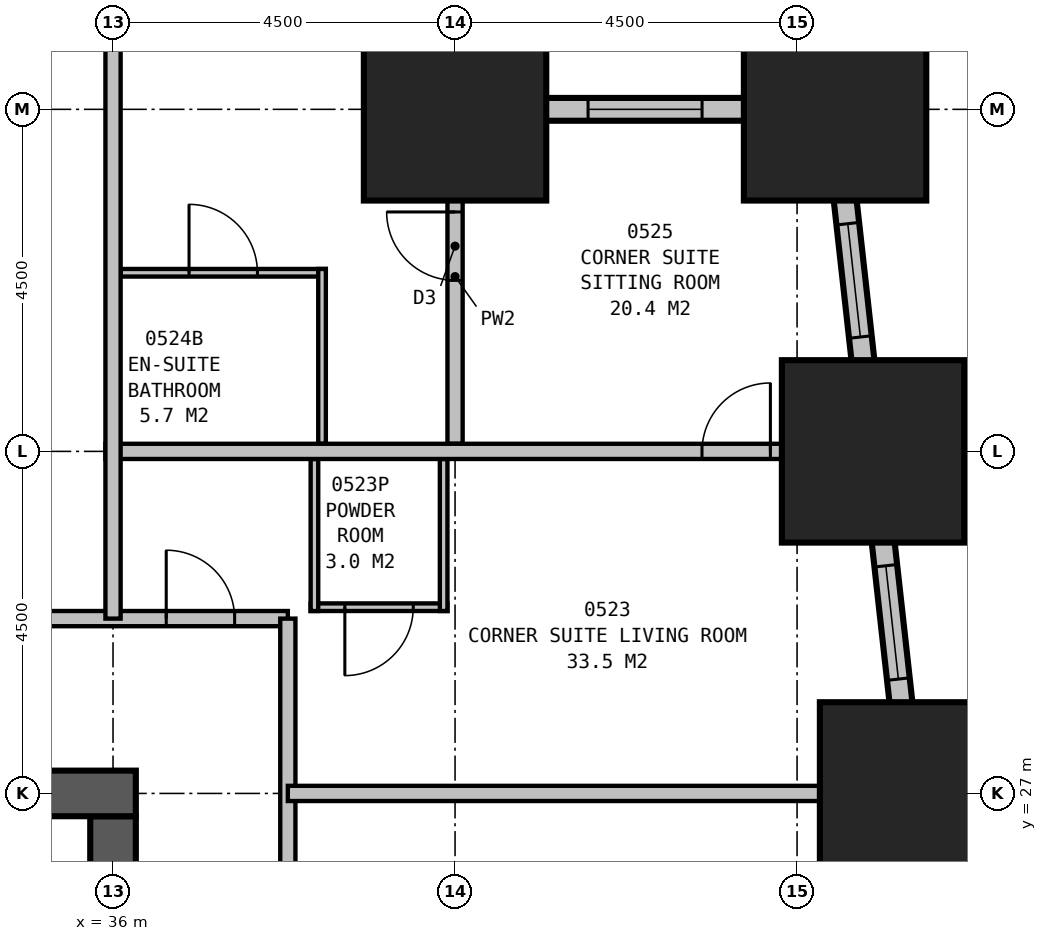
"""IFC4 building model, lengths in metres.
Left out: names, types, materials, properties, quantities, classifications, styles, units other than length and angle.
Written with IfcOpenShell. Run it as: python <this file> out.ifc"""

import sys

from ifc_helpers import new_model, si_unit, direction, frame, frame_2d, origin, origin_2d, place, context, subcontext, project, spatial, rectangle, extrude, element, fill, save


model = new_model("IFC4")
c1 = context("Model", 3, precision=1e-05, world=origin(), true_north=direction((0.0, 1.0)))
c2 = subcontext(c1, "Body", "Model", "MODEL_VIEW")
j1 = project(units=[si_unit("LENGTHUNIT", "METRE"), si_unit("PLANEANGLEUNIT", "RADIAN")], contexts=[c1])
p1 = place(None, origin())
s1 = spatial("IfcSite", under=j1, at=p1, CompositionType="ELEMENT")
p2 = place(p1, origin())
s2 = spatial("IfcBuilding", under=s1, at=p2, CompositionType="ELEMENT")
p3 = place(p2, frame((0.0, 0.0, 29.7)))
s3 = spatial("IfcBuildingStorey", under=s2, at=p3, CompositionType="ELEMENT", Elevation=29.7)
for number, where, z_axis, x_axis in (
    (1, (46.5, 27.0, 0.0), (0.0, 0.0, 1.0), (1.0, 0.0, 0.0)),
    (2, (46.0, 31.5, 0.0), (0.0, 0.0, 1.0), (1.0, 0.0, 0.0)),
    (3, (45.5, 36.0, 0.0), (0.0, 0.0, 1.0), (1.0, 0.0, 0.0)),
    (4, (40.5, 36.0, 0.0), (0.0, 0.0, 1.0), (1.0, 0.0, 0.0)),
):
    element("IfcColumn", number, at=place(p3, frame(where, z_axis=z_axis, x_axis=x_axis)), inside=s3, PredefinedType="COLUMN", context=c2, shape_type="SweptSolid", body=[
        extrude(rectangle(XDim=2.4, YDim=2.4, at=origin_2d()), origin(), (0.0, 0.0, 1.0), 3.5),
    ])
p4 = place(p3, frame((36.3, 27.0, 0.0), z_axis=(0.0, 0.0, 1.0), x_axis=(-1.0, 0.0, 0.0)))
e5 = element("IfcWall", 5, at=p4, inside=s3, PredefinedType="SHEAR", context=c2, shape_type="SweptSolid", body=[
    extrude(rectangle(XDim=23.1, YDim=0.6, at=frame_2d((11.55, 0.0))), origin(), (0.0, 0.0, 1.0), 3.5),
])
p5 = place(p4, frame((17.05, 0.0, 0.0)))
e6 = element("IfcOpeningElement", 6, at=p5, cuts=e5, PredefinedType="OPENING", context=c2, shape_type="SweptSolid", body=[
    extrude(rectangle(XDim=1.0, YDim=2.1, at=frame_2d((0.5, 1.05))), frame((0.0, 0.31, 0.0), z_axis=(0.0, -1.0, 0.0), x_axis=(1.0, 0.0, 0.0)), (0.0, 0.0, 1.0), 0.62),
])
p6 = place(p4, frame((12.05, 0.0, 0.0)))
e7 = element("IfcOpeningElement", 7, at=p6, cuts=e5, PredefinedType="OPENING", context=c2, shape_type="SweptSolid", body=[
    extrude(rectangle(XDim=1.0, YDim=2.1, at=frame_2d((0.5, 1.05))), frame((0.0, 0.31, 0.0), z_axis=(0.0, -1.0, 0.0), x_axis=(1.0, 0.0, 0.0)), (0.0, 0.0, 1.0), 0.62),
])
p7 = place(p4, frame((7.05, 0.0, 0.0)))
e8 = element("IfcOpeningElement", 8, at=p7, cuts=e5, PredefinedType="OPENING", context=c2, shape_type="SweptSolid", body=[
    extrude(rectangle(XDim=1.0, YDim=2.1, at=frame_2d((0.5, 1.05))), frame((0.0, 0.31, 0.0), z_axis=(0.0, -1.0, 0.0), x_axis=(1.0, 0.0, 0.0)), (0.0, 0.0, 1.0), 0.62),
])
p8 = place(p3, frame((36.0, 20.0, 0.0), z_axis=(0.0, 0.0, 1.0), x_axis=(0.0, 1.0, 0.0)))
e9 = element("IfcWall", 9, at=p8, inside=s3, PredefinedType="SHEAR", context=c2, shape_type="SweptSolid", body=[
    extrude(rectangle(XDim=6.7, YDim=0.6, at=frame_2d((3.35, 0.0))), origin(), (0.0, 0.0, 1.0), 3.5),
])
p9 = place(p3, frame((49.017, 4.351, 0.0), z_axis=(0.0, 0.0, 1.0), x_axis=(-0.110433201132, 0.993883548555, 0.0)))
e10 = element("IfcWall", 10, at=p9, inside=s3, PredefinedType="STANDARD", context=c2, shape_type="SweptSolid", body=[
    extrude(rectangle(XDim=31.994, YDim=0.3, at=frame_2d((15.997, 0.0))), origin(), (0.0, 0.0, 1.0), 2.05),
])
p10 = place(p9, frame((1.664, 0.0, 0.5)))
e11 = element("IfcOpeningElement", 11, at=p10, cuts=e10, PredefinedType="OPENING", context=c2, shape_type="SweptSolid", body=[
    extrude(rectangle(XDim=1.5, YDim=1.4, at=frame_2d((0.75, 0.7))), frame((0.0, 0.16, 0.0), z_axis=(0.0, -1.0, 0.0), x_axis=(1.0, 0.0, 0.0)), (0.0, 0.0, 1.0), 0.32),
])
p11 = place(p9, frame((6.192, 0.0, 0.5)))
e12 = element("IfcOpeningElement", 12, at=p11, cuts=e10, PredefinedType="OPENING", context=c2, shape_type="SweptSolid", body=[
    extrude(rectangle(XDim=1.5, YDim=1.4, at=frame_2d((0.75, 0.7))), frame((0.0, 0.16, 0.0), z_axis=(0.0, -1.0, 0.0), x_axis=(1.0, 0.0, 0.0)), (0.0, 0.0, 1.0), 0.32),
])
p12 = place(p9, frame((10.719, 0.0, 0.5)))
e13 = element("IfcOpeningElement", 13, at=p12, cuts=e10, PredefinedType="OPENING", context=c2, shape_type="SweptSolid", body=[
    extrude(rectangle(XDim=1.5, YDim=1.4, at=frame_2d((0.75, 0.7))), frame((0.0, 0.16, 0.0), z_axis=(0.0, -1.0, 0.0), x_axis=(1.0, 0.0, 0.0)), (0.0, 0.0, 1.0), 0.32),
])
p13 = place(p9, frame((15.247, 0.0, 0.5)))
e14 = element("IfcOpeningElement", 14, at=p13, cuts=e10, PredefinedType="OPENING", context=c2, shape_type="SweptSolid", body=[
    extrude(rectangle(XDim=1.5, YDim=1.4, at=frame_2d((0.75, 0.7))), frame((0.0, 0.16, 0.0), z_axis=(0.0, -1.0, 0.0), x_axis=(1.0, 0.0, 0.0)), (0.0, 0.0, 1.0), 0.32),
])
p14 = place(p9, frame((19.775, 0.0, 0.5)))
e15 = element("IfcOpeningElement", 15, at=p14, cuts=e10, PredefinedType="OPENING", context=c2, shape_type="SweptSolid", body=[
    extrude(rectangle(XDim=1.5, YDim=1.4, at=frame_2d((0.75, 0.7))), frame((0.0, 0.16, 0.0), z_axis=(0.0, -1.0, 0.0), x_axis=(1.0, 0.0, 0.0)), (0.0, 0.0, 1.0), 0.32),
])
p15 = place(p9, frame((24.302, 0.0, 0.5)))
e16 = element("IfcOpeningElement", 16, at=p15, cuts=e10, PredefinedType="OPENING", context=c2, shape_type="SweptSolid", body=[
    extrude(rectangle(XDim=1.5, YDim=1.4, at=frame_2d((0.75, 0.7))), frame((0.0, 0.16, 0.0), z_axis=(0.0, -1.0, 0.0), x_axis=(1.0, 0.0, 0.0)), (0.0, 0.0, 1.0), 0.32),
])
p16 = place(p9, frame((28.83, 0.0, 0.5)))
e17 = element("IfcOpeningElement", 17, at=p16, cuts=e10, PredefinedType="OPENING", context=c2, shape_type="SweptSolid", body=[
    extrude(rectangle(XDim=1.5, YDim=1.4, at=frame_2d((0.75, 0.7))), frame((0.0, 0.16, 0.0), z_axis=(0.0, -1.0, 0.0), x_axis=(1.0, 0.0, 0.0)), (0.0, 0.0, 1.0), 0.32),
])
p17 = place(p3, frame((45.65, 36.0, 0.0), z_axis=(0.0, 0.0, 1.0), x_axis=(-1.0, 0.0, 0.0)))
e18 = element("IfcWall", 18, at=p17, inside=s3, PredefinedType="STANDARD", context=c2, shape_type="SweptSolid", body=[
    extrude(rectangle(XDim=5.3, YDim=0.3, at=frame_2d((2.65, 0.0))), origin(), (0.0, 0.0, 1.0), 2.05),
])
p18 = place(p17, frame((1.9, 0.0, 0.5)))
e19 = element("IfcOpeningElement", 19, at=p18, cuts=e18, PredefinedType="OPENING", context=c2, shape_type="SweptSolid", body=[
    extrude(rectangle(XDim=1.5, YDim=1.4, at=frame_2d((0.75, 0.7))), frame((0.0, 0.16, 0.0), z_axis=(0.0, -1.0, 0.0), x_axis=(1.0, 0.0, 0.0)), (0.0, 0.0, 1.0), 0.32),
])
p19 = place(p3, frame((40.5, 35.85, 0.0), z_axis=(0.0, 0.0, 1.0), x_axis=(0.0, 1.0, 0.0)))
e20 = element("IfcWall", 20, at=p19, inside=s3, PredefinedType="STANDARD", context=c2, shape_type="SweptSolid", body=[
    extrude(rectangle(XDim=4.8, YDim=0.3, at=frame_2d((2.4, 0.0))), origin(), (0.0, 0.0, 1.0), 2.05),
])
p20 = place(p19, frame((1.65, 0.0, 0.5)))
e21 = element("IfcOpeningElement", 21, at=p20, cuts=e20, PredefinedType="OPENING", context=c2, shape_type="SweptSolid", body=[
    extrude(rectangle(XDim=1.5, YDim=1.4, at=frame_2d((0.75, 0.7))), frame((0.0, 0.16, 0.0), z_axis=(0.0, -1.0, 0.0), x_axis=(1.0, 0.0, 0.0)), (0.0, 0.0, 1.0), 0.32),
])
p21 = place(p3, frame((11.2, 29.3, 0.0), z_axis=(0.0, 0.0, 1.0), x_axis=(1.0, 0.0, 0.0)))
e22 = element("IfcWall", 22, at=p21, inside=s3, PredefinedType="PARTITIONING", context=c2, shape_type="SweptSolid", body=[
    extrude(rectangle(XDim=27.1, YDim=0.2, at=frame_2d((13.55, 0.0))), origin(), (0.0, 0.0, 1.0), 3.25),
])
p22 = place(p21, frame((5.05, 0.0, 0.0)))
e23 = element("IfcOpeningElement", 23, at=p22, cuts=e22, PredefinedType="OPENING", context=c2, shape_type="SweptSolid", body=[
    extrude(rectangle(XDim=0.9, YDim=2.1, at=frame_2d((0.45, 1.05))), frame((0.0, 0.11, 0.0), z_axis=(0.0, -1.0, 0.0), x_axis=(1.0, 0.0, 0.0)), (0.0, 0.0, 1.0), 0.22),
])
p23 = place(p21, frame((9.55, 0.0, 0.0)))
e24 = element("IfcOpeningElement", 24, at=p23, cuts=e22, PredefinedType="OPENING", context=c2, shape_type="SweptSolid", body=[
    extrude(rectangle(XDim=0.9, YDim=2.1, at=frame_2d((0.45, 1.05))), frame((0.0, 0.11, 0.0), z_axis=(0.0, -1.0, 0.0), x_axis=(1.0, 0.0, 0.0)), (0.0, 0.0, 1.0), 0.22),
])
p24 = place(p21, frame((14.05, 0.0, 0.0)))
e25 = element("IfcOpeningElement", 25, at=p24, cuts=e22, PredefinedType="OPENING", context=c2, shape_type="SweptSolid", body=[
    extrude(rectangle(XDim=0.9, YDim=2.1, at=frame_2d((0.45, 1.05))), frame((0.0, 0.11, 0.0), z_axis=(0.0, -1.0, 0.0), x_axis=(1.0, 0.0, 0.0)), (0.0, 0.0, 1.0), 0.22),
])
p25 = place(p21, frame((18.55, 0.0, 0.0)))
e26 = element("IfcOpeningElement", 26, at=p25, cuts=e22, PredefinedType="OPENING", context=c2, shape_type="SweptSolid", body=[
    extrude(rectangle(XDim=0.9, YDim=2.1, at=frame_2d((0.45, 1.05))), frame((0.0, 0.11, 0.0), z_axis=(0.0, -1.0, 0.0), x_axis=(1.0, 0.0, 0.0)), (0.0, 0.0, 1.0), 0.22),
])
p26 = place(p21, frame((23.05, 0.0, 0.0)))
e27 = element("IfcOpeningElement", 27, at=p26, cuts=e22, PredefinedType="OPENING", context=c2, shape_type="SweptSolid", body=[
    extrude(rectangle(XDim=0.9, YDim=2.1, at=frame_2d((0.45, 1.05))), frame((0.0, 0.11, 0.0), z_axis=(0.0, -1.0, 0.0), x_axis=(1.0, 0.0, 0.0)), (0.0, 0.0, 1.0), 0.22),
])
p27 = place(p21, frame((25.5, 0.0, 0.0)))
e28 = element("IfcOpeningElement", 28, at=p27, cuts=e22, PredefinedType="OPENING", context=c2, shape_type="SweptSolid", body=[
    extrude(rectangle(XDim=0.9, YDim=2.1, at=frame_2d((0.45, 1.05))), frame((0.0, 0.11, 0.0), z_axis=(0.0, -1.0, 0.0), x_axis=(1.0, 0.0, 0.0)), (0.0, 0.0, 1.0), 0.22),
])
p28 = place(p21, frame((0.7, 0.0, 0.0)))
e29 = element("IfcOpeningElement", 29, at=p28, cuts=e22, PredefinedType="OPENING", context=c2, shape_type="SweptSolid", body=[
    extrude(rectangle(XDim=0.9, YDim=2.1, at=frame_2d((0.45, 1.05))), frame((0.0, 0.11, 0.0), z_axis=(0.0, -1.0, 0.0), x_axis=(1.0, 0.0, 0.0)), (0.0, 0.0, 1.0), 0.22),
])
p29 = place(p3, frame((38.3, 11.2, 0.0), z_axis=(0.0, 0.0, 1.0), x_axis=(0.0, 1.0, 0.0)))
e30 = element("IfcWall", 30, at=p29, inside=s3, PredefinedType="PARTITIONING", context=c2, shape_type="SweptSolid", body=[
    extrude(rectangle(XDim=18.1, YDim=0.2, at=frame_2d((9.05, 0.0))), origin(), (0.0, 0.0, 1.0), 3.25),
])
p30 = place(p29, frame((5.95, 0.0, 0.0), z_axis=(0.0, 0.0, 1.0), x_axis=(-1.0, 0.0, 0.0)))
e31 = element("IfcOpeningElement", 31, at=p30, cuts=e30, PredefinedType="OPENING", context=c2, shape_type="SweptSolid", body=[
    extrude(rectangle(XDim=0.9, YDim=2.1, at=frame_2d((0.45, 1.05))), frame((0.0, 0.11, 0.0), z_axis=(0.0, -1.0, 0.0), x_axis=(1.0, 0.0, 0.0)), (0.0, 0.0, 1.0), 0.22),
])
p31 = place(p29, frame((10.45, 0.0, 0.0), z_axis=(0.0, 0.0, 1.0), x_axis=(-1.0, 0.0, 0.0)))
e32 = element("IfcOpeningElement", 32, at=p31, cuts=e30, PredefinedType="OPENING", context=c2, shape_type="SweptSolid", body=[
    extrude(rectangle(XDim=0.9, YDim=2.1, at=frame_2d((0.45, 1.05))), frame((0.0, 0.11, 0.0), z_axis=(0.0, -1.0, 0.0), x_axis=(1.0, 0.0, 0.0)), (0.0, 0.0, 1.0), 0.22),
])
p32 = place(p29, frame((13.0, 0.0, 0.0), z_axis=(0.0, 0.0, 1.0), x_axis=(-1.0, 0.0, 0.0)))
e33 = element("IfcOpeningElement", 33, at=p32, cuts=e30, PredefinedType="OPENING", context=c2, shape_type="SweptSolid", body=[
    extrude(rectangle(XDim=1.0, YDim=2.1, at=frame_2d((0.5, 1.05))), frame((0.0, 0.11, 0.0), z_axis=(0.0, -1.0, 0.0), x_axis=(1.0, 0.0, 0.0)), (0.0, 0.0, 1.0), 0.22),
])
p33 = place(p3, frame((38.3, 27.0, 0.0), z_axis=(0.0, 0.0, 1.0), x_axis=(1.0, 0.0, 0.0)))
e34 = element("IfcWall", 34, at=p33, inside=s3, PredefinedType="PARTITIONING", context=c2, shape_type="SweptSolid", body=[
    extrude(rectangle(XDim=7.977, YDim=0.2, at=frame_2d((3.988, 0.0))), origin(), (0.0, 0.0, 1.0), 1.95),
])
p34 = place(p3, frame((36.0, 29.3, 0.0), z_axis=(0.0, 0.0, 1.0), x_axis=(0.0, 1.0, 0.0)))
e35 = element("IfcWall", 35, at=p34, inside=s3, PredefinedType="PARTITIONING", context=c2, shape_type="SweptSolid", body=[
    extrude(rectangle(XDim=11.2, YDim=0.2, at=frame_2d((5.6, 0.0))), origin(), (0.0, 0.0, 1.0), 2.25),
])
p35 = place(p3, frame((35.9, 31.5, 0.0), z_axis=(0.0, 0.0, 1.0), x_axis=(1.0, 0.0, 0.0)))
e36 = element("IfcWall", 36, at=p35, inside=s3, PredefinedType="PARTITIONING", context=c2, shape_type="SweptSolid", body=[
    extrude(rectangle(XDim=10.099, YDim=0.2, at=frame_2d((5.05, 0.0))), origin(), (0.0, 0.0, 1.0), 3.25),
])
p36 = place(p35, frame((7.849, 0.0, 0.0)))
e37 = element("IfcOpeningElement", 37, at=p36, cuts=e36, PredefinedType="OPENING", context=c2, shape_type="SweptSolid", body=[
    extrude(rectangle(XDim=0.9, YDim=2.1, at=frame_2d((0.45, 1.05))), frame((0.0, 0.11, 0.0), z_axis=(0.0, -1.0, 0.0), x_axis=(1.0, 0.0, 0.0)), (0.0, 0.0, 1.0), 0.22),
])
p37 = place(p3, frame((40.35, 31.4, 0.0), z_axis=(0.0, 0.0, 1.0), x_axis=(0.0, -1.0, 0.0)))
e38 = element("IfcWall", 38, at=p37, inside=s3, PredefinedType="PLUMBINGWALL", context=c2, shape_type="SweptSolid", body=[
    extrude(rectangle(XDim=2.0, YDim=0.1, at=frame_2d((1.0, 0.0))), origin(), (0.0, 0.0, 1.0), 2.25),
])
p38 = place(p3, frame((38.65, 31.4, 0.0), z_axis=(0.0, 0.0, 1.0), x_axis=(0.0, -1.0, 0.0)))
e39 = element("IfcWall", 39, at=p38, inside=s3, PredefinedType="PLUMBINGWALL", context=c2, shape_type="SweptSolid", body=[
    extrude(rectangle(XDim=2.0, YDim=0.1, at=frame_2d((1.0, 0.0))), origin(), (0.0, 0.0, 1.0), 3.25),
])
p39 = place(p3, frame((38.6, 29.45, 0.0), z_axis=(0.0, 0.0, 1.0), x_axis=(1.0, 0.0, 0.0)))
e40 = element("IfcWall", 40, at=p39, inside=s3, PredefinedType="PLUMBINGWALL", context=c2, shape_type="SweptSolid", body=[
    extrude(rectangle(XDim=1.8, YDim=0.1, at=frame_2d((0.9, 0.0))), origin(), (0.0, 0.0, 1.0), 3.25),
])
p40 = place(p39, frame((1.35, 0.0, 0.0), z_axis=(0.0, 0.0, 1.0), x_axis=(-1.0, 0.0, 0.0)))
e41 = element("IfcOpeningElement", 41, at=p40, cuts=e40, PredefinedType="OPENING", context=c2, shape_type="SweptSolid", body=[
    extrude(rectangle(XDim=0.9, YDim=2.1, at=frame_2d((0.45, 1.05))), frame((0.0, 0.06, 0.0), z_axis=(0.0, -1.0, 0.0), x_axis=(1.0, 0.0, 0.0)), (0.0, 0.0, 1.0), 0.12),
])
p41 = place(p3, frame((40.5, 31.6, 0.0), z_axis=(0.0, 0.0, 1.0), x_axis=(0.0, 1.0, 0.0)))
e42 = element("IfcWall", 42, at=p41, inside=s3, PredefinedType="PARTITIONING", context=c2, shape_type="SweptSolid", body=[
    extrude(rectangle(XDim=4.4, YDim=0.2, at=frame_2d((2.2, 0.0))), origin(), (0.0, 0.0, 1.0), 2.25),
])
p42 = place(p41, frame((2.15, 0.0, 0.0)))
e43 = element("IfcOpeningElement", 43, at=p42, cuts=e42, PredefinedType="OPENING", context=c2, shape_type="SweptSolid", body=[
    extrude(rectangle(XDim=0.9, YDim=2.1, at=frame_2d((0.45, 1.05))), frame((0.0, 0.11, 0.0), z_axis=(0.0, -1.0, 0.0), x_axis=(1.0, 0.0, 0.0)), (0.0, 0.0, 1.0), 0.22),
])
p43 = place(p3, frame((38.75, 31.6, 0.0), z_axis=(0.0, 0.0, 1.0), x_axis=(0.0, 1.0, 0.0)))
e44 = element("IfcWall", 44, at=p43, inside=s3, PredefinedType="PLUMBINGWALL", context=c2, shape_type="SweptSolid", body=[
    extrude(rectangle(XDim=2.3, YDim=0.1, at=frame_2d((1.15, 0.0))), origin(), (0.0, 0.0, 1.0), 3.25),
])
p44 = place(p3, frame((36.1, 33.85, 0.0), z_axis=(0.0, 0.0, 1.0), x_axis=(1.0, 0.0, 0.0)))
e45 = element("IfcWall", 45, at=p44, inside=s3, PredefinedType="PLUMBINGWALL", context=c2, shape_type="SweptSolid", body=[
    extrude(rectangle(XDim=2.7, YDim=0.1, at=frame_2d((1.35, 0.0))), origin(), (0.0, 0.0, 1.0), 3.25),
])
p45 = place(p44, frame((0.9, 0.0, 0.0)))
e46 = element("IfcOpeningElement", 46, at=p45, cuts=e45, PredefinedType="OPENING", context=c2, shape_type="SweptSolid", body=[
    extrude(rectangle(XDim=0.9, YDim=2.1, at=frame_2d((0.45, 1.05))), frame((0.0, 0.06, 0.0), z_axis=(0.0, -1.0, 0.0), x_axis=(1.0, 0.0, 0.0)), (0.0, 0.0, 1.0), 0.12),
])
p46 = place(p15, origin())
e47 = element("IfcWindow", 47, at=p46, inside=s3, PartitioningType="SINGLE_PANEL", PredefinedType="WINDOW", context=c2, shape_type="SweptSolid", body=[
    extrude(rectangle(XDim=1.5, YDim=1.4, at=frame_2d((0.75, 0.7))), frame((0.0, 0.03, 0.0), z_axis=(0.0, -1.0, 0.0), x_axis=(1.0, 0.0, 0.0)), (0.0, 0.0, 1.0), 0.06),
])
fill(e16, e47)
p47 = place(p16, origin())
e48 = element("IfcWindow", 48, at=p47, inside=s3, PartitioningType="SINGLE_PANEL", PredefinedType="WINDOW", context=c2, shape_type="SweptSolid", body=[
    extrude(rectangle(XDim=1.5, YDim=1.4, at=frame_2d((0.75, 0.7))), frame((0.0, 0.03, 0.0), z_axis=(0.0, -1.0, 0.0), x_axis=(1.0, 0.0, 0.0)), (0.0, 0.0, 1.0), 0.06),
])
fill(e17, e48)
p48 = place(p18, origin())
e49 = element("IfcWindow", 49, at=p48, inside=s3, PartitioningType="SINGLE_PANEL", PredefinedType="WINDOW", context=c2, shape_type="SweptSolid", body=[
    extrude(rectangle(XDim=1.5, YDim=1.4, at=frame_2d((0.75, 0.7))), frame((0.0, 0.03, 0.0), z_axis=(0.0, -1.0, 0.0), x_axis=(1.0, 0.0, 0.0)), (0.0, 0.0, 1.0), 0.06),
])
fill(e19, e49)
p49 = place(p27, origin())
e50 = element("IfcDoor", 50, at=p49, inside=s3, OperationType="SINGLE_SWING_LEFT", PredefinedType="DOOR", context=c2, shape_type="SweptSolid", body=[
    extrude(rectangle(XDim=0.9, YDim=2.1, at=frame_2d((0.45, 1.05))), frame((0.0, 0.025, 0.0), z_axis=(0.0, -1.0, 0.0), x_axis=(1.0, 0.0, 0.0)), (0.0, 0.0, 1.0), 0.05),
])
fill(e28, e50)
p50 = place(p36, origin())
e51 = element("IfcDoor", 51, at=p50, inside=s3, OperationType="SINGLE_SWING_RIGHT", PredefinedType="DOOR", context=c2, shape_type="SweptSolid", body=[
    extrude(rectangle(XDim=0.9, YDim=2.1, at=frame_2d((0.45, 1.05))), frame((0.0, 0.025, 0.0), z_axis=(0.0, -1.0, 0.0), x_axis=(1.0, 0.0, 0.0)), (0.0, 0.0, 1.0), 0.05),
])
fill(e37, e51)
p51 = place(p40, origin())
e52 = element("IfcDoor", 52, at=p51, inside=s3, OperationType="SINGLE_SWING_RIGHT", PredefinedType="DOOR", context=c2, shape_type="SweptSolid", body=[
    extrude(rectangle(XDim=0.9, YDim=2.1, at=frame_2d((0.45, 1.05))), frame((0.0, 0.025, 0.0), z_axis=(0.0, -1.0, 0.0), x_axis=(1.0, 0.0, 0.0)), (0.0, 0.0, 1.0), 0.05),
])
fill(e41, e52)
p52 = place(p42, origin())
e53 = element("IfcDoor", 53, at=p52, inside=s3, OperationType="SINGLE_SWING_RIGHT", PredefinedType="DOOR", context=c2, shape_type="SweptSolid", body=[
    extrude(rectangle(XDim=0.9, YDim=2.1, at=frame_2d((0.45, 1.05))), frame((0.0, 0.025, 0.0), z_axis=(0.0, -1.0, 0.0), x_axis=(1.0, 0.0, 0.0)), (0.0, 0.0, 1.0), 0.05),
])
fill(e43, e53)
p53 = place(p45, origin())
e54 = element("IfcDoor", 54, at=p53, inside=s3, OperationType="SINGLE_SWING_LEFT", PredefinedType="DOOR", context=c2, shape_type="SweptSolid", body=[
    extrude(rectangle(XDim=0.9, YDim=2.1, at=frame_2d((0.45, 1.05))), frame((0.0, 0.025, 0.0), z_axis=(0.0, -1.0, 0.0), x_axis=(1.0, 0.0, 0.0)), (0.0, 0.0, 1.0), 0.05),
])
fill(e46, e54)
save(model, sys.argv[1])
